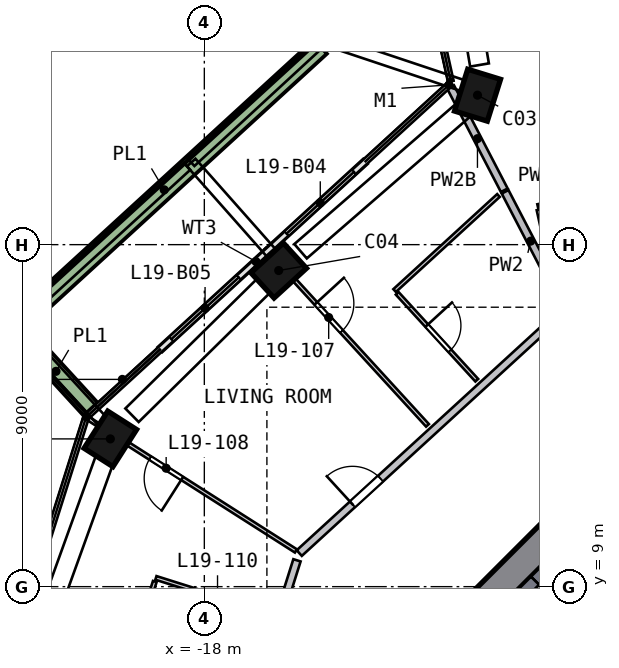
"""IFC4 building model, lengths in metres.
Left out: names, types, materials, properties, quantities, classifications, styles, units other than length and angle.
Written with IfcOpenShell. Run it as: python <this file> out.ifc"""

import sys

from ifc_helpers import new_model, si_unit, direction, frame, frame_2d, origin, origin_2d, place, context, subcontext, project, spatial, polyline, rectangle, outline, extrude, element, fill, save


model = new_model("IFC4")
c1 = context("Model", 3, precision=1e-05, world=origin(), true_north=direction((0.0, 1.0)))
c2 = subcontext(c1, "Body", "Model", "MODEL_VIEW")
j1 = project(units=[si_unit("LENGTHUNIT", "METRE"), si_unit("PLANEANGLEUNIT", "RADIAN")], contexts=[c1])
p1 = place(None, origin())
s1 = spatial("IfcSite", under=j1, at=p1, CompositionType="ELEMENT")
p2 = place(p1, origin())
s2 = spatial("IfcBuilding", under=s1, at=p2, CompositionType="ELEMENT")
p3 = place(p2, frame((0.0, 0.0, 86.0)))
s3 = spatial("IfcBuildingStorey", under=s2, at=p3, CompositionType="ELEMENT", Elevation=86.0)
p4 = place(p3, frame((-10.686, 21.996, 0.0), z_axis=(-0.104141217, -0.051690531, 0.993218353), x_axis=(0.293489764, 0.952579581, 0.080348622)))
e1 = element("IfcColumn", 1, at=p4, inside=s3, PredefinedType="COLUMN", context=c2, shape_type="SweptSolid", body=[
    extrude(rectangle(XDim=1.15, YDim=0.9, at=origin_2d()), origin(), (0.0, 0.0, 1.0), 3.212),
])
p5 = place(p3, frame((-15.944, 17.412, 0.0), z_axis=(-0.08213443, -0.076582751, 0.993674503), x_axis=(-0.732490696, -0.671451632, -0.112294638)))
e2 = element("IfcColumn", 2, at=p5, inside=s3, PredefinedType="COLUMN", context=c2, shape_type="SweptSolid", body=[
    extrude(rectangle(XDim=1.15, YDim=0.9, at=origin_2d()), origin(), (0.0, 0.0, 1.0), 3.21),
])
p6 = place(p3, frame((-20.399, 13.006, 0.0), z_axis=(-0.061048974, -0.097541511, 0.993357275), x_axis=(0.534139029, 0.837529173, 0.115066858)))
e3 = element("IfcColumn", 3, at=p6, inside=s3, PredefinedType="COLUMN", context=c2, shape_type="SweptSolid", body=[
    extrude(rectangle(XDim=1.15, YDim=0.9, at=origin_2d()), origin(), (0.0, 0.0, 1.0), 3.211),
])
p7 = place(p3, frame((-5.516, 13.717, 0.0), z_axis=(0.0, 0.0, 1.0), x_axis=(-0.707106781, -0.707106781, 0.0)))
e4 = element("IfcWall", 4, at=p7, inside=s3, PredefinedType="SHEAR", context=c2, shape_type="SweptSolid", body=[
    extrude(rectangle(XDim=11.598, YDim=0.8, at=frame_2d((5.799, 0.0))), origin(), (0.0, 0.0, 1.0), 3.5),
])
p8 = place(p3, frame((-13.769, 20.182, 0.0), z_axis=(0.0, 0.0, 1.0), x_axis=(-0.737477764, -0.675371415, 0.0)))
e5 = element("IfcWall", 5, at=p8, inside=s3, PredefinedType="SOLIDWALL", context=c2, shape_type="SweptSolid", body=[
    extrude(rectangle(XDim=3.475, YDim=0.15, at=frame_2d((1.738, 0.0))), origin(), (0.0, 0.0, 1.0), 2.425),
])
p9 = place(p8, frame((0.4, 0.0, 0.0)))
e6 = element("IfcOpeningElement", 6, at=p9, cuts=e5, PredefinedType="OPENING", context=c2, shape_type="SweptSolid", body=[
    extrude(rectangle(XDim=2.4, YDim=2.4, at=frame_2d((1.2, 1.2))), frame((0.0, 0.085, 0.0), z_axis=(0.0, -1.0, 0.0), x_axis=(1.0, 0.0, 0.0)), (0.0, 0.0, 1.0), 0.17),
])
p10 = place(p3, frame((-16.332, 17.835, 0.0), z_axis=(0.0, 0.0, 1.0), x_axis=(-0.737547703, -0.675295036, 0.0)))
e7 = element("IfcWall", 7, at=p10, inside=s3, PredefinedType="SOLIDWALL", context=c2, shape_type="SweptSolid", body=[
    extrude(rectangle(XDim=3.835, YDim=0.15, at=frame_2d((1.918, 0.0))), origin(), (0.0, 0.0, 1.0), 2.425),
])
p11 = place(p10, frame((1.035, 0.0, 0.0)))
e8 = element("IfcOpeningElement", 8, at=p11, cuts=e7, PredefinedType="OPENING", context=c2, shape_type="SweptSolid", body=[
    extrude(rectangle(XDim=2.4, YDim=2.4, at=frame_2d((1.2, 1.2))), frame((0.0, 0.085, 0.0), z_axis=(0.0, -1.0, 0.0), x_axis=(1.0, 0.0, 0.0)), (0.0, 0.0, 1.0), 0.17),
])
p12 = place(p3, frame((-14.943, 23.208, 0.0), z_axis=(0.0, 0.0, 1.0), x_axis=(-0.737508426, -0.675337932, 0.0)))
e9 = element("IfcWall", 9, at=p12, inside=s3, PredefinedType="SOLIDWALL", context=c2, shape_type="SweptSolid", body=[
    extrude(rectangle(XDim=11.153, YDim=0.5, at=frame_2d((5.576, 0.0))), origin(), (0.0, 0.0, 1.0), 0.7),
])
p13 = place(p3, frame((-22.815, 15.661, 0.0), z_axis=(0.0, 0.0, 1.0), x_axis=(0.675257533, -0.737582039, 0.0)))
e10 = element("IfcWall", 10, at=p13, inside=s3, PredefinedType="SOLIDWALL", context=c2, shape_type="SweptSolid", body=[
    extrude(rectangle(XDim=2.699, YDim=0.5, at=frame_2d((1.35, 0.0))), origin(), (0.0, 0.0, 1.0), 0.7),
])
p14 = place(p3, origin())
e11 = element("IfcWall", 11, at=p14, inside=s3, PredefinedType="SOLIDWALL", context=c2, shape_type="SweptSolid", body=[
    extrude(outline(polyline([(-9.405, 9.263), (-7.354, 11.314), (-5.056, 9.016), (-5.197, 8.874), (-7.283, 10.96), (-9.051, 9.192), (-6.965, 7.106), (-7.106, 6.965), (-9.405, 9.263)])), origin(), (0.0, 0.0, 1.0), 3.19),
])
p15 = place(p3, origin())
e12 = element("IfcWall", 12, at=p15, inside=s3, PredefinedType="SOLIDWALL", context=c2, shape_type="SweptSolid", body=[
    extrude(outline(polyline([(-11.314, 7.354), (-9.405, 9.263), (-9.192, 9.051), (-10.96, 7.283), (-8.874, 5.197), (-9.016, 5.056), (-11.314, 7.354)])), origin(), (0.0, 0.0, 1.0), 3.19),
])
p16 = place(p3, frame((-18.307, 1.0, 0.0), z_axis=(0.0, 0.0, 1.0), x_axis=(0.301042929, 0.953610589, 0.0)))
e13 = element("IfcWall", 13, at=p16, inside=s3, PredefinedType="SOLIDWALL", context=c2, shape_type="SweptSolid", body=[
    extrude(rectangle(XDim=9.116, YDim=0.2, at=frame_2d((4.558, 0.0))), origin(), (0.0, 0.0, 1.0), 3.19),
])
p17 = place(p16, frame((0.2, 0.0, 0.0)))
e14 = element("IfcOpeningElement", 14, at=p17, cuts=e13, PredefinedType="OPENING", context=c2, shape_type="SweptSolid", body=[
    extrude(rectangle(XDim=1.0, YDim=2.1, at=frame_2d((0.5, 1.05))), frame((0.0, 0.11, 0.0), z_axis=(0.0, -1.0, 0.0), x_axis=(1.0, 0.0, 0.0)), (0.0, 0.0, 1.0), 0.22),
])
p18 = place(p3, frame((-15.502, 9.884, 0.0), z_axis=(0.0, 0.0, 1.0), x_axis=(0.73751517, 0.675330566, 0.0)))
e15 = element("IfcWall", 15, at=p18, inside=s3, PredefinedType="SOLIDWALL", context=c2, shape_type="SweptSolid", body=[
    extrude(rectangle(XDim=9.317, YDim=0.2, at=frame_2d((4.658, 0.0))), origin(), (0.0, 0.0, 1.0), 3.19),
])
p19 = place(p18, frame((1.9, 0.0, 0.0)))
e16 = element("IfcOpeningElement", 16, at=p19, cuts=e15, PredefinedType="OPENING", context=c2, shape_type="SweptSolid", body=[
    extrude(rectangle(XDim=1.0, YDim=2.1, at=frame_2d((0.5, 1.05))), frame((0.0, 0.11, 0.0), z_axis=(0.0, -1.0, 0.0), x_axis=(1.0, 0.0, 0.0)), (0.0, 0.0, 1.0), 0.22),
])
p20 = place(p3, frame((-10.107, 19.431, 0.0), z_axis=(0.0, 0.0, 1.0), x_axis=(-0.461415509, 0.887184157, 0.0)))
e17 = element("IfcWall", 17, at=p20, inside=s3, PredefinedType="SOLIDWALL", context=c2, shape_type="SweptSolid", body=[
    extrude(rectangle(XDim=3.062, YDim=0.2, at=frame_2d((1.531, 0.0))), origin(), (0.0, 0.0, 1.0), 2.69),
])
p21 = place(p3, frame((-8.736, 16.796, 0.0), z_axis=(0.0, 0.0, 1.0), x_axis=(-0.461415822, 0.887183994, 0.0)))
e18 = element("IfcWall", 18, at=p21, inside=s3, PredefinedType="SOLIDWALL", context=c2, shape_type="SweptSolid", body=[
    extrude(rectangle(XDim=2.924, YDim=0.2, at=frame_2d((1.462, 0.0))), origin(), (0.0, 0.0, 1.0), 3.19),
])
p22 = place(p3, frame((-19.304, 9.135, 0.0), z_axis=(0.0, 0.0, 1.0), x_axis=(-0.301105403, -0.953590864, 0.0)))
e19 = element("IfcWall", 19, at=p22, inside=s3, PredefinedType="PARTITIONING", context=c2, shape_type="SweptSolid", body=[
    extrude(rectangle(XDim=2.7, YDim=0.1, at=frame_2d((1.35, 0.0))), origin(), (0.0, 0.0, 1.0), 3.19),
])
p23 = place(p3, frame((-15.589, 9.939, 0.0), z_axis=(0.0, 0.0, 1.0), x_axis=(-0.843215663, 0.537575433, 0.0)))
e20 = element("IfcWall", 20, at=p23, inside=s3, PredefinedType="PARTITIONING", context=c2, shape_type="SweptSolid", body=[
    extrude(rectangle(XDim=6.476, YDim=0.1, at=frame_2d((3.238, 0.0))), origin(), (0.0, 0.0, 1.0), 3.19),
])
p24 = place(p23, frame((3.55, 0.0, 0.0)))
e21 = element("IfcOpeningElement", 21, at=p24, cuts=e20, PredefinedType="OPENING", context=c2, shape_type="SweptSolid", body=[
    extrude(rectangle(XDim=1.0, YDim=2.1, at=frame_2d((0.5, 1.05))), frame((0.0, 0.06, 0.0), z_axis=(0.0, -1.0, 0.0), x_axis=(1.0, 0.0, 0.0)), (0.0, 0.0, 1.0), 0.12),
])
p25 = place(p3, frame((-16.222, 8.267, 0.0), z_axis=(0.0, 0.0, 1.0), x_axis=(-0.953627625, 0.300988958, 0.0)))
e22 = element("IfcWall", 22, at=p25, inside=s3, PredefinedType="PARTITIONING", context=c2, shape_type="SweptSolid", body=[
    extrude(rectangle(XDim=3.2, YDim=0.1, at=frame_2d((1.6, 0.0))), origin(), (0.0, 0.0, 1.0), 3.19),
])
p26 = place(p25, frame((1.05, 0.0, 0.0)))
e23 = element("IfcOpeningElement", 23, at=p26, cuts=e22, PredefinedType="OPENING", context=c2, shape_type="SweptSolid", body=[
    extrude(rectangle(XDim=0.9, YDim=2.1, at=frame_2d((0.45, 1.05))), frame((0.0, 0.06, 0.0), z_axis=(0.0, -1.0, 0.0), x_axis=(1.0, 0.0, 0.0)), (0.0, 0.0, 1.0), 0.12),
])
p27 = place(p3, frame((-16.281, 17.78, 0.0), z_axis=(0.0, 0.0, 1.0), x_axis=(0.67532007, -0.737524781, 0.0)))
e24 = element("IfcWall", 24, at=p27, inside=s3, PredefinedType="PARTITIONING", context=c2, shape_type="SweptSolid", body=[
    extrude(rectangle(XDim=6.15, YDim=0.1, at=frame_2d((3.075, 0.0))), origin(), (0.0, 0.0, 1.0), 3.19),
])
p28 = place(p27, frame((1.8, 0.0, 0.0)))
e25 = element("IfcOpeningElement", 25, at=p28, cuts=e24, PredefinedType="OPENING", context=c2, shape_type="SweptSolid", body=[
    extrude(rectangle(XDim=1.0, YDim=2.1, at=frame_2d((0.5, 1.05))), frame((0.0, 0.06, 0.0), z_axis=(0.0, -1.0, 0.0), x_axis=(1.0, 0.0, 0.0)), (0.0, 0.0, 1.0), 0.12),
])
p29 = place(p3, frame((-12.925, 16.718, 0.0), z_axis=(0.0, 0.0, 1.0), x_axis=(0.675314409, -0.737529964, 0.0)))
e26 = element("IfcWall", 26, at=p29, inside=s3, PredefinedType="PARTITIONING", context=c2, shape_type="SweptSolid", body=[
    extrude(rectangle(XDim=3.1, YDim=0.1, at=frame_2d((1.55, 0.0))), origin(), (0.0, 0.0, 1.0), 3.19),
])
p30 = place(p29, frame((1.15, 0.0, 0.0)))
e27 = element("IfcOpeningElement", 27, at=p30, cuts=e26, PredefinedType="OPENING", context=c2, shape_type="SweptSolid", body=[
    extrude(rectangle(XDim=0.9, YDim=2.1, at=frame_2d((0.45, 1.05))), frame((0.0, 0.06, 0.0), z_axis=(0.0, -1.0, 0.0), x_axis=(1.0, 0.0, 0.0)), (0.0, 0.0, 1.0), 0.12),
])
p31 = place(p3, frame((-10.26, 19.293, 0.0), z_axis=(0.0, 0.0, 1.0), x_axis=(-0.737501517, -0.675345477, 0.0)))
e28 = element("IfcWall", 28, at=p31, inside=s3, PredefinedType="PARTITIONING", context=c2, shape_type="SweptSolid", body=[
    extrude(rectangle(XDim=3.704, YDim=0.1, at=frame_2d((1.852, 0.0))), origin(), (0.0, 0.0, 1.0), 3.19),
])
p32 = place(p3, frame((-8.903, 17.551, 0.0), z_axis=(0.0, 0.0, 1.0), x_axis=(-0.215950668, 0.976404275, 0.0)))
e29 = element("IfcWall", 29, at=p32, inside=s3, PredefinedType="PARTITIONING", context=c2, shape_type="SweptSolid", body=[
    extrude(rectangle(XDim=1.398, YDim=0.1, at=frame_2d((0.699, 0.0))), origin(), (0.0, 0.0, 1.0), 3.19),
])
p33 = place(p3, frame((-5.712, 19.792, 0.0), z_axis=(0.0, 0.0, 1.0), x_axis=(-0.976378166, -0.216068684, 0.0)))
e30 = element("IfcWall", 30, at=p33, inside=s3, PredefinedType="PARTITIONING", context=c2, shape_type="SweptSolid", body=[
    extrude(rectangle(XDim=3.6, YDim=0.1, at=frame_2d((1.8, 0.0))), origin(), (0.0, 0.0, 1.0), 3.19),
])
p34 = place(p33, frame((1.2, 0.0, 0.0)))
e31 = element("IfcOpeningElement", 31, at=p34, cuts=e30, PredefinedType="OPENING", context=c2, shape_type="SweptSolid", body=[
    extrude(rectangle(XDim=1.0, YDim=2.1, at=frame_2d((0.5, 1.05))), frame((0.0, 0.06, 0.0), z_axis=(0.0, -1.0, 0.0), x_axis=(1.0, 0.0, 0.0)), (0.0, 0.0, 1.0), 0.12),
])
p35 = place(p9, origin())
e32 = element("IfcDoor", 32, at=p35, inside=s3, OperationType="SLIDING_TO_RIGHT", PredefinedType="DOOR", context=c2, shape_type="SweptSolid", body=[
    extrude(rectangle(XDim=2.4, YDim=2.4, at=frame_2d((1.2, 1.2))), frame((0.0, 0.025, 0.0), z_axis=(0.0, -1.0, 0.0), x_axis=(1.0, 0.0, 0.0)), (0.0, 0.0, 1.0), 0.05),
])
fill(e6, e32)
p36 = place(p11, origin())
e33 = element("IfcDoor", 33, at=p36, inside=s3, OperationType="SLIDING_TO_LEFT", PredefinedType="DOOR", context=c2, shape_type="SweptSolid", body=[
    extrude(rectangle(XDim=2.4, YDim=2.4, at=frame_2d((1.2, 1.2))), frame((0.0, 0.025, 0.0), z_axis=(0.0, -1.0, 0.0), x_axis=(1.0, 0.0, 0.0)), (0.0, 0.0, 1.0), 0.05),
])
fill(e8, e33)
p37 = place(p19, origin())
e34 = element("IfcDoor", 34, at=p37, inside=s3, OperationType="SINGLE_SWING_LEFT", PredefinedType="DOOR", context=c2, shape_type="SweptSolid", body=[
    extrude(rectangle(XDim=1.0, YDim=2.1, at=frame_2d((0.5, 1.05))), frame((0.0, 0.025, 0.0), z_axis=(0.0, -1.0, 0.0), x_axis=(1.0, 0.0, 0.0)), (0.0, 0.0, 1.0), 0.05),
])
fill(e16, e34)
p38 = place(p28, origin())
e35 = element("IfcDoor", 35, at=p38, inside=s3, OperationType="SINGLE_SWING_LEFT", PredefinedType="DOOR", context=c2, shape_type="SweptSolid", body=[
    extrude(rectangle(XDim=1.0, YDim=2.1, at=frame_2d((0.5, 1.05))), frame((0.0, 0.025, 0.0), z_axis=(0.0, -1.0, 0.0), x_axis=(1.0, 0.0, 0.0)), (0.0, 0.0, 1.0), 0.05),
])
fill(e25, e35)
p39 = place(p24, origin())
e36 = element("IfcDoor", 36, at=p39, inside=s3, OperationType="SINGLE_SWING_LEFT", PredefinedType="DOOR", context=c2, shape_type="SweptSolid", body=[
    extrude(rectangle(XDim=1.0, YDim=2.1, at=frame_2d((0.5, 1.05))), frame((0.0, 0.025, 0.0), z_axis=(0.0, -1.0, 0.0), x_axis=(1.0, 0.0, 0.0)), (0.0, 0.0, 1.0), 0.05),
])
fill(e21, e36)
p40 = place(p30, origin())
e37 = element("IfcDoor", 37, at=p40, inside=s3, OperationType="SINGLE_SWING_LEFT", PredefinedType="DOOR", context=c2, shape_type="SweptSolid", body=[
    extrude(rectangle(XDim=0.9, YDim=2.1, at=frame_2d((0.45, 1.05))), frame((0.0, 0.025, 0.0), z_axis=(0.0, -1.0, 0.0), x_axis=(1.0, 0.0, 0.0)), (0.0, 0.0, 1.0), 0.05),
])
fill(e27, e37)
save(model, sys.argv[1])
